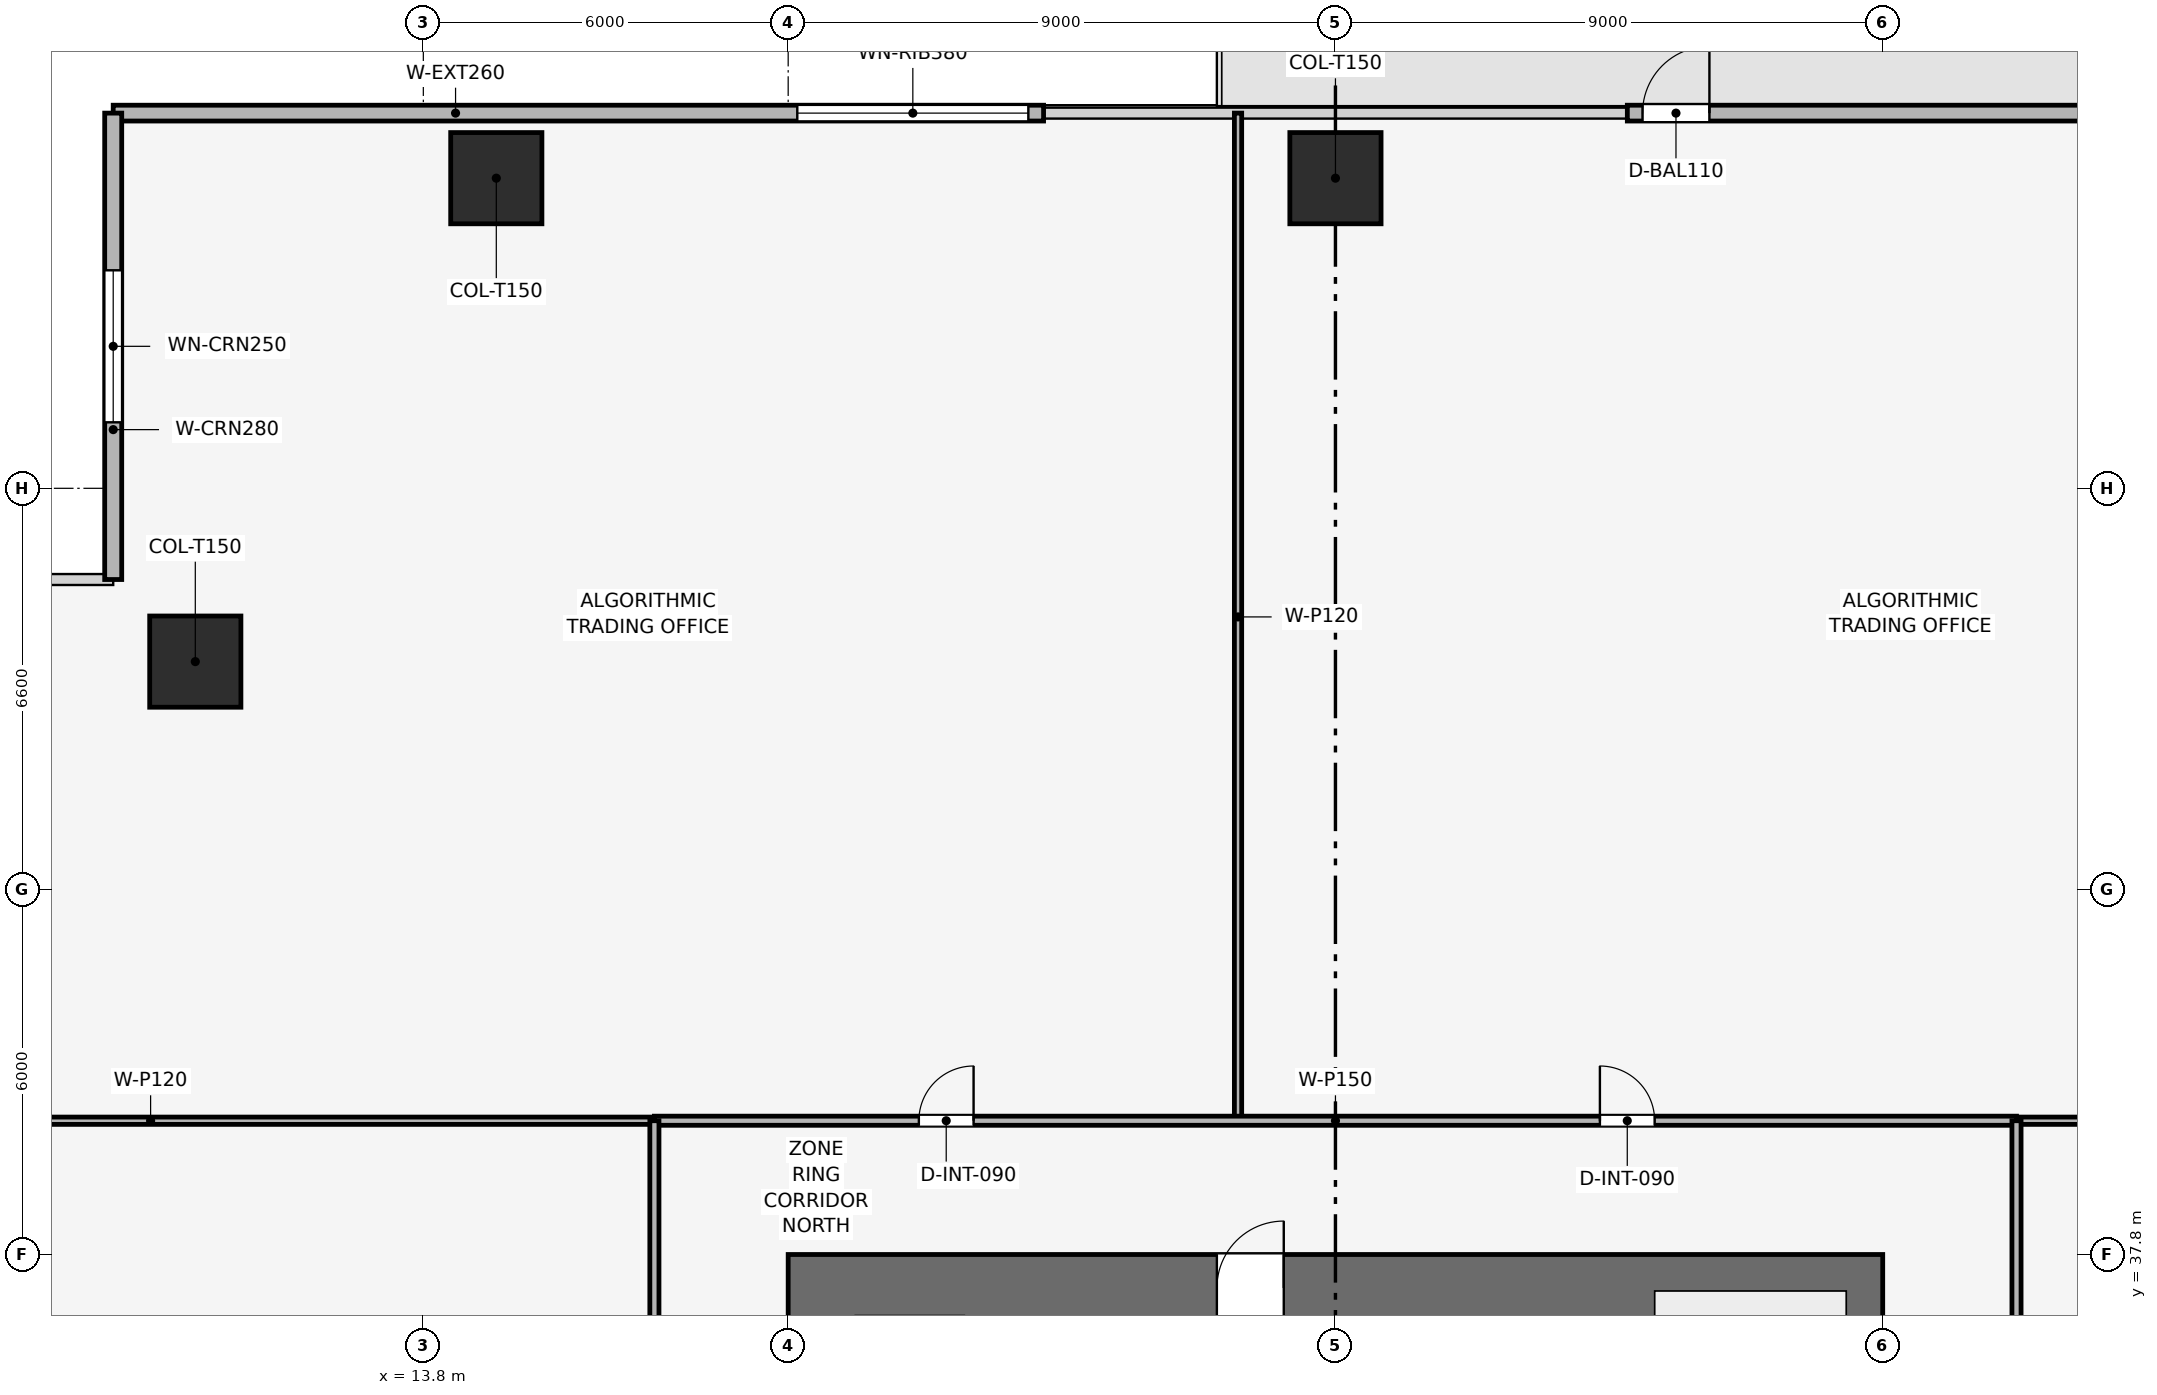
"""IFC4 building model, lengths in metres.
Left out: names, types, materials, properties, quantities, classifications, styles, units other than length and angle.
Written with IfcOpenShell. Run it as: python <this file> out.ifc"""

import sys

from ifc_helpers import new_model, si_unit, direction, frame, frame_2d, origin, origin_2d, place, context, subcontext, project, spatial, rectangle, extrude, element, fill, save


model = new_model("IFC4")
c1 = context("Model", 3, precision=1e-05, world=origin(), true_north=direction((0.0, 1.0)))
c2 = subcontext(c1, "Body", "Model", "MODEL_VIEW")
j1 = project(units=[si_unit("LENGTHUNIT", "METRE"), si_unit("PLANEANGLEUNIT", "RADIAN")], contexts=[c1])
p1 = place(None, origin())
s1 = spatial("IfcSite", under=j1, at=p1, CompositionType="ELEMENT")
p2 = place(p1, origin())
s2 = spatial("IfcBuilding", under=s1, at=p2, CompositionType="ELEMENT")
p3 = place(p2, frame((0.0, 0.0, 30.0)))
s3 = spatial("IfcBuildingStorey", under=s2, at=p3, CompositionType="ELEMENT", Elevation=30.0)
p4 = place(p3, frame((19.8, 37.25, 0.0), z_axis=(0.0, 0.0, 1.0), x_axis=(1.0, 0.0, 0.0)))
e1 = element("IfcWall", 1, at=p4, inside=s3, PredefinedType="SHEAR", context=c2, shape_type="SweptSolid", body=[
    extrude(rectangle(XDim=18.0, YDim=1.1, at=frame_2d((9.0, 0.0))), origin(), (0.0, 0.0, 1.0), 3.9),
])
p5 = place(p4, frame((7.05, 0.0, 0.0)))
e2 = element("IfcOpeningElement", 2, at=p5, cuts=e1, PredefinedType="OPENING", context=c2, shape_type="SweptSolid", body=[
    extrude(rectangle(XDim=1.1, YDim=2.15, at=frame_2d((0.55, 1.075))), frame((0.0, 0.56, 0.0), z_axis=(0.0, -1.0, 0.0), x_axis=(1.0, 0.0, 0.0)), (0.0, 0.0, 1.0), 1.12),
])
for number, where, z_axis, x_axis in (
    (3, (28.8, 55.5, 0.003), (0.0, 0.0, 1.0), (1.0, 0.0, 0.0)),
    (4, (15.0, 55.5, 0.003), (0.0, 0.0, 1.0), (1.0, 0.0, 0.0)),
    (5, (10.05, 47.55, 0.003), (0.0, 0.0, 1.0), (1.0, 0.0, 0.0)),
):
    element("IfcColumn", number, at=place(p3, frame(where, z_axis=z_axis, x_axis=x_axis)), inside=s3, PredefinedType="COLUMN", context=c2, shape_type="SweptSolid", body=[
        extrude(rectangle(XDim=1.5, YDim=1.5, at=origin_2d()), origin(), (0.0, 0.0, 1.0), 3.644),
    ])
p6 = place(p3, frame((8.7, 56.57, 0.0), z_axis=(0.0, 0.0, 1.0), x_axis=(1.0, 0.0, 0.0)))
e6 = element("IfcWall", 6, at=p6, inside=s3, PredefinedType="SOLIDWALL", context=c2, shape_type="SweptSolid", body=[
    extrude(rectangle(XDim=15.3, YDim=0.26, at=frame_2d((7.65, 0.0))), origin(), (0.0, 0.0, 1.0), 3.65),
])
p7 = place(p6, frame((11.25, 0.0, 0.9)))
e7 = element("IfcOpeningElement", 7, at=p7, cuts=e6, PredefinedType="OPENING", context=c2, shape_type="SweptSolid", body=[
    extrude(rectangle(XDim=3.8, YDim=1.9, at=frame_2d((1.9, 0.95))), frame((0.0, 0.14, 0.0), z_axis=(0.0, -1.0, 0.0), x_axis=(1.0, 0.0, 0.0)), (0.0, 0.0, 1.0), 0.28),
])
p8 = place(p3, frame((33.6, 56.57, 0.0), z_axis=(0.0, 0.0, 1.0), x_axis=(1.0, 0.0, 0.0)))
e8 = element("IfcWall", 8, at=p8, inside=s3, PredefinedType="SOLIDWALL", context=c2, shape_type="SweptSolid", body=[
    extrude(rectangle(XDim=15.3, YDim=0.26, at=frame_2d((7.65, 0.0))), origin(), (0.0, 0.0, 1.0), 3.65),
])
p9 = place(p8, frame((0.25, 0.0, 0.0)))
e9 = element("IfcOpeningElement", 9, at=p9, cuts=e8, PredefinedType="OPENING", context=c2, shape_type="SweptSolid", body=[
    extrude(rectangle(XDim=1.1, YDim=2.2, at=frame_2d((0.55, 1.1))), frame((0.0, 0.14, 0.0), z_axis=(0.0, -1.0, 0.0), x_axis=(1.0, 0.0, 0.0)), (0.0, 0.0, 1.0), 0.28),
])
p10 = place(p3, frame((8.7, 48.9, 0.0), z_axis=(0.0, 0.0, 1.0), x_axis=(0.0, 1.0, 0.0)))
e10 = element("IfcWall", 10, at=p10, inside=s3, PredefinedType="SOLIDWALL", context=c2, shape_type="SweptSolid", body=[
    extrude(rectangle(XDim=7.67, YDim=0.28, at=frame_2d((3.835, 0.0))), origin(), (0.0, 0.0, 1.0), 3.65),
])
p11 = place(p10, frame((2.585, 0.0, 0.9)))
e11 = element("IfcOpeningElement", 11, at=p11, cuts=e10, PredefinedType="OPENING", context=c2, shape_type="SweptSolid", body=[
    extrude(rectangle(XDim=2.5, YDim=1.9, at=frame_2d((1.25, 0.95))), frame((0.0, 0.15, 0.0), z_axis=(0.0, -1.0, 0.0), x_axis=(1.0, 0.0, 0.0)), (0.0, 0.0, 1.0), 0.3),
])
for number, where, z_axis, x_axis in (
    (12, (27.198, 40.0, 0.0), (0.0, 0.0, 1.0), (0.0, 1.0, 0.0)),
    (13, (1.03, 40.0, 0.0), (0.0, 0.0, 1.0), (1.0, 0.0, 0.0)),
    (14, (40.0, 40.0, 0.0), (0.0, 0.0, 1.0), (1.0, 0.0, 0.0)),
):
    element("IfcWall", number, at=place(p3, frame(where, z_axis=z_axis, x_axis=x_axis)), inside=s3, PredefinedType="PARTITIONING", context=c2, shape_type="SweptSolid", body=[
        extrude(rectangle(XDim=16.57, YDim=0.12, at=frame_2d((8.285, 0.0))), origin(), (0.0, 0.0, 1.0), 2.935),
    ])
p12 = place(p3, frame((17.6, 40.0, 0.0), z_axis=(0.0, 0.0, 1.0), x_axis=(1.0, 0.0, 0.0)))
e15 = element("IfcWall", 15, at=p12, inside=s3, PredefinedType="PARTITIONING", context=c2, shape_type="SweptSolid", body=[
    extrude(rectangle(XDim=22.4, YDim=0.15, at=frame_2d((11.2, 0.0))), origin(), (0.0, 0.0, 1.0), 3.085),
])
p13 = place(p12, frame((4.349, 0.0, 0.0)))
e16 = element("IfcOpeningElement", 16, at=p13, cuts=e15, PredefinedType="OPENING", context=c2, shape_type="SweptSolid", body=[
    extrude(rectangle(XDim=0.9, YDim=2.1, at=frame_2d((0.45, 1.05))), frame((0.0, 0.085, 0.0), z_axis=(0.0, -1.0, 0.0), x_axis=(1.0, 0.0, 0.0)), (0.0, 0.0, 1.0), 0.17),
])
p14 = place(p12, frame((15.549, 0.0, 0.0)))
e17 = element("IfcOpeningElement", 17, at=p14, cuts=e15, PredefinedType="OPENING", context=c2, shape_type="SweptSolid", body=[
    extrude(rectangle(XDim=0.9, YDim=2.1, at=frame_2d((0.45, 1.05))), frame((0.0, 0.085, 0.0), z_axis=(0.0, -1.0, 0.0), x_axis=(1.0, 0.0, 0.0)), (0.0, 0.0, 1.0), 0.17),
])
p15 = place(p3, frame((17.6, 17.6, 0.0), z_axis=(0.0, 0.0, 1.0), x_axis=(0.0, 1.0, 0.0)))
e18 = element("IfcWall", 18, at=p15, inside=s3, PredefinedType="PARTITIONING", context=c2, shape_type="SweptSolid", body=[
    extrude(rectangle(XDim=22.4, YDim=0.15, at=frame_2d((11.2, 0.0))), origin(), (0.0, 0.0, 1.0), 3.085),
])
p16 = place(p15, frame((0.85, 0.0, 0.0)))
e19 = element("IfcOpeningElement", 19, at=p16, cuts=e18, PredefinedType="OPENING", context=c2, shape_type="SweptSolid", body=[
    extrude(rectangle(XDim=0.9, YDim=2.1, at=frame_2d((0.45, 1.05))), frame((0.0, 0.085, 0.0), z_axis=(0.0, -1.0, 0.0), x_axis=(1.0, 0.0, 0.0)), (0.0, 0.0, 1.0), 0.17),
])
p17 = place(p15, frame((3.55, 0.0, 0.0)))
e20 = element("IfcOpeningElement", 20, at=p17, cuts=e18, PredefinedType="OPENING", context=c2, shape_type="SweptSolid", body=[
    extrude(rectangle(XDim=0.9, YDim=2.1, at=frame_2d((0.45, 1.05))), frame((0.0, 0.085, 0.0), z_axis=(0.0, -1.0, 0.0), x_axis=(1.0, 0.0, 0.0)), (0.0, 0.0, 1.0), 0.17),
])
p18 = place(p15, frame((6.45, 0.0, 0.0)))
e21 = element("IfcOpeningElement", 21, at=p18, cuts=e18, PredefinedType="OPENING", context=c2, shape_type="SweptSolid", body=[
    extrude(rectangle(XDim=0.9, YDim=2.1, at=frame_2d((0.45, 1.05))), frame((0.0, 0.085, 0.0), z_axis=(0.0, -1.0, 0.0), x_axis=(1.0, 0.0, 0.0)), (0.0, 0.0, 1.0), 0.17),
])
p19 = place(p15, frame((9.2, 0.0, 0.0)))
e22 = element("IfcOpeningElement", 22, at=p19, cuts=e18, PredefinedType="OPENING", context=c2, shape_type="SweptSolid", body=[
    extrude(rectangle(XDim=0.95, YDim=2.1, at=frame_2d((0.475, 1.05))), frame((0.0, 0.085, 0.0), z_axis=(0.0, -1.0, 0.0), x_axis=(1.0, 0.0, 0.0)), (0.0, 0.0, 1.0), 0.17),
])
p20 = place(p15, frame((16.25, 0.0, 0.0)))
e23 = element("IfcOpeningElement", 23, at=p20, cuts=e18, PredefinedType="OPENING", context=c2, shape_type="SweptSolid", body=[
    extrude(rectangle(XDim=0.9, YDim=2.1, at=frame_2d((0.45, 1.05))), frame((0.0, 0.085, 0.0), z_axis=(0.0, -1.0, 0.0), x_axis=(1.0, 0.0, 0.0)), (0.0, 0.0, 1.0), 0.17),
])
p21 = place(p3, frame((40.0, 17.6, 0.0), z_axis=(0.0, 0.0, 1.0), x_axis=(0.0, 1.0, 0.0)))
e24 = element("IfcWall", 24, at=p21, inside=s3, PredefinedType="PARTITIONING", context=c2, shape_type="SweptSolid", body=[
    extrude(rectangle(XDim=22.4, YDim=0.15, at=frame_2d((11.2, 0.0))), origin(), (0.0, 0.0, 1.0), 3.085),
])
p22 = place(p21, frame((0.7, 0.0, 0.0)))
e25 = element("IfcOpeningElement", 25, at=p22, cuts=e24, PredefinedType="OPENING", context=c2, shape_type="SweptSolid", body=[
    extrude(rectangle(XDim=0.9, YDim=2.1, at=frame_2d((0.45, 1.05))), frame((0.0, 0.085, 0.0), z_axis=(0.0, -1.0, 0.0), x_axis=(1.0, 0.0, 0.0)), (0.0, 0.0, 1.0), 0.17),
])
p23 = place(p21, frame((6.404, 0.0, 0.0)))
e26 = element("IfcOpeningElement", 26, at=p23, cuts=e24, PredefinedType="OPENING", context=c2, shape_type="SweptSolid", body=[
    extrude(rectangle(XDim=0.9, YDim=2.1, at=frame_2d((0.45, 1.05))), frame((0.0, 0.085, 0.0), z_axis=(0.0, -1.0, 0.0), x_axis=(1.0, 0.0, 0.0)), (0.0, 0.0, 1.0), 0.17),
])
p24 = place(p21, frame((16.454, 0.0, 0.0)))
e27 = element("IfcOpeningElement", 27, at=p24, cuts=e24, PredefinedType="OPENING", context=c2, shape_type="SweptSolid", body=[
    extrude(rectangle(XDim=0.9, YDim=2.1, at=frame_2d((0.45, 1.05))), frame((0.0, 0.085, 0.0), z_axis=(0.0, -1.0, 0.0), x_axis=(1.0, 0.0, 0.0)), (0.0, 0.0, 1.0), 0.17),
])
p25 = place(p9, origin())
e28 = element("IfcDoor", 28, at=p25, inside=s3, OperationType="SINGLE_SWING_RIGHT", PredefinedType="DOOR", context=c2, shape_type="SweptSolid", body=[
    extrude(rectangle(XDim=1.1, YDim=2.2, at=frame_2d((0.55, 1.1))), frame((0.0, 0.025, 0.0), z_axis=(0.0, -1.0, 0.0), x_axis=(1.0, 0.0, 0.0)), (0.0, 0.0, 1.0), 0.05),
])
fill(e9, e28)
p26 = place(p7, origin())
e29 = element("IfcWindow", 29, at=p26, inside=s3, PartitioningType="SINGLE_PANEL", PredefinedType="WINDOW", context=c2, shape_type="SweptSolid", body=[
    extrude(rectangle(XDim=3.8, YDim=1.9, at=frame_2d((1.9, 0.95))), frame((0.0, 0.03, 0.0), z_axis=(0.0, -1.0, 0.0), x_axis=(1.0, 0.0, 0.0)), (0.0, 0.0, 1.0), 0.06),
])
fill(e7, e29)
p27 = place(p11, origin())
e30 = element("IfcWindow", 30, at=p27, inside=s3, PartitioningType="SINGLE_PANEL", PredefinedType="WINDOW", context=c2, shape_type="SweptSolid", body=[
    extrude(rectangle(XDim=2.5, YDim=1.9, at=frame_2d((1.25, 0.95))), frame((0.0, 0.03, 0.0), z_axis=(0.0, -1.0, 0.0), x_axis=(1.0, 0.0, 0.0)), (0.0, 0.0, 1.0), 0.06),
])
fill(e11, e30)
p28 = place(p13, origin())
e31 = element("IfcDoor", 31, at=p28, inside=s3, OperationType="SINGLE_SWING_RIGHT", PredefinedType="DOOR", context=c2, shape_type="SweptSolid", body=[
    extrude(rectangle(XDim=0.9, YDim=2.1, at=frame_2d((0.45, 1.05))), frame((0.0, 0.025, 0.0), z_axis=(0.0, -1.0, 0.0), x_axis=(1.0, 0.0, 0.0)), (0.0, 0.0, 1.0), 0.05),
])
fill(e16, e31)
p29 = place(p14, origin())
e32 = element("IfcDoor", 32, at=p29, inside=s3, OperationType="SINGLE_SWING_LEFT", PredefinedType="DOOR", context=c2, shape_type="SweptSolid", body=[
    extrude(rectangle(XDim=0.9, YDim=2.1, at=frame_2d((0.45, 1.05))), frame((0.0, 0.025, 0.0), z_axis=(0.0, -1.0, 0.0), x_axis=(1.0, 0.0, 0.0)), (0.0, 0.0, 1.0), 0.05),
])
fill(e17, e32)
p30 = place(p5, origin())
e33 = element("IfcDoor", 33, at=p30, inside=s3, OperationType="SINGLE_SWING_RIGHT", PredefinedType="DOOR", context=c2, shape_type="SweptSolid", body=[
    extrude(rectangle(XDim=1.1, YDim=2.15, at=frame_2d((0.55, 1.075))), frame((0.0, 0.025, 0.0), z_axis=(0.0, -1.0, 0.0), x_axis=(1.0, 0.0, 0.0)), (0.0, 0.0, 1.0), 0.05),
])
fill(e2, e33)
save(model, sys.argv[1])
